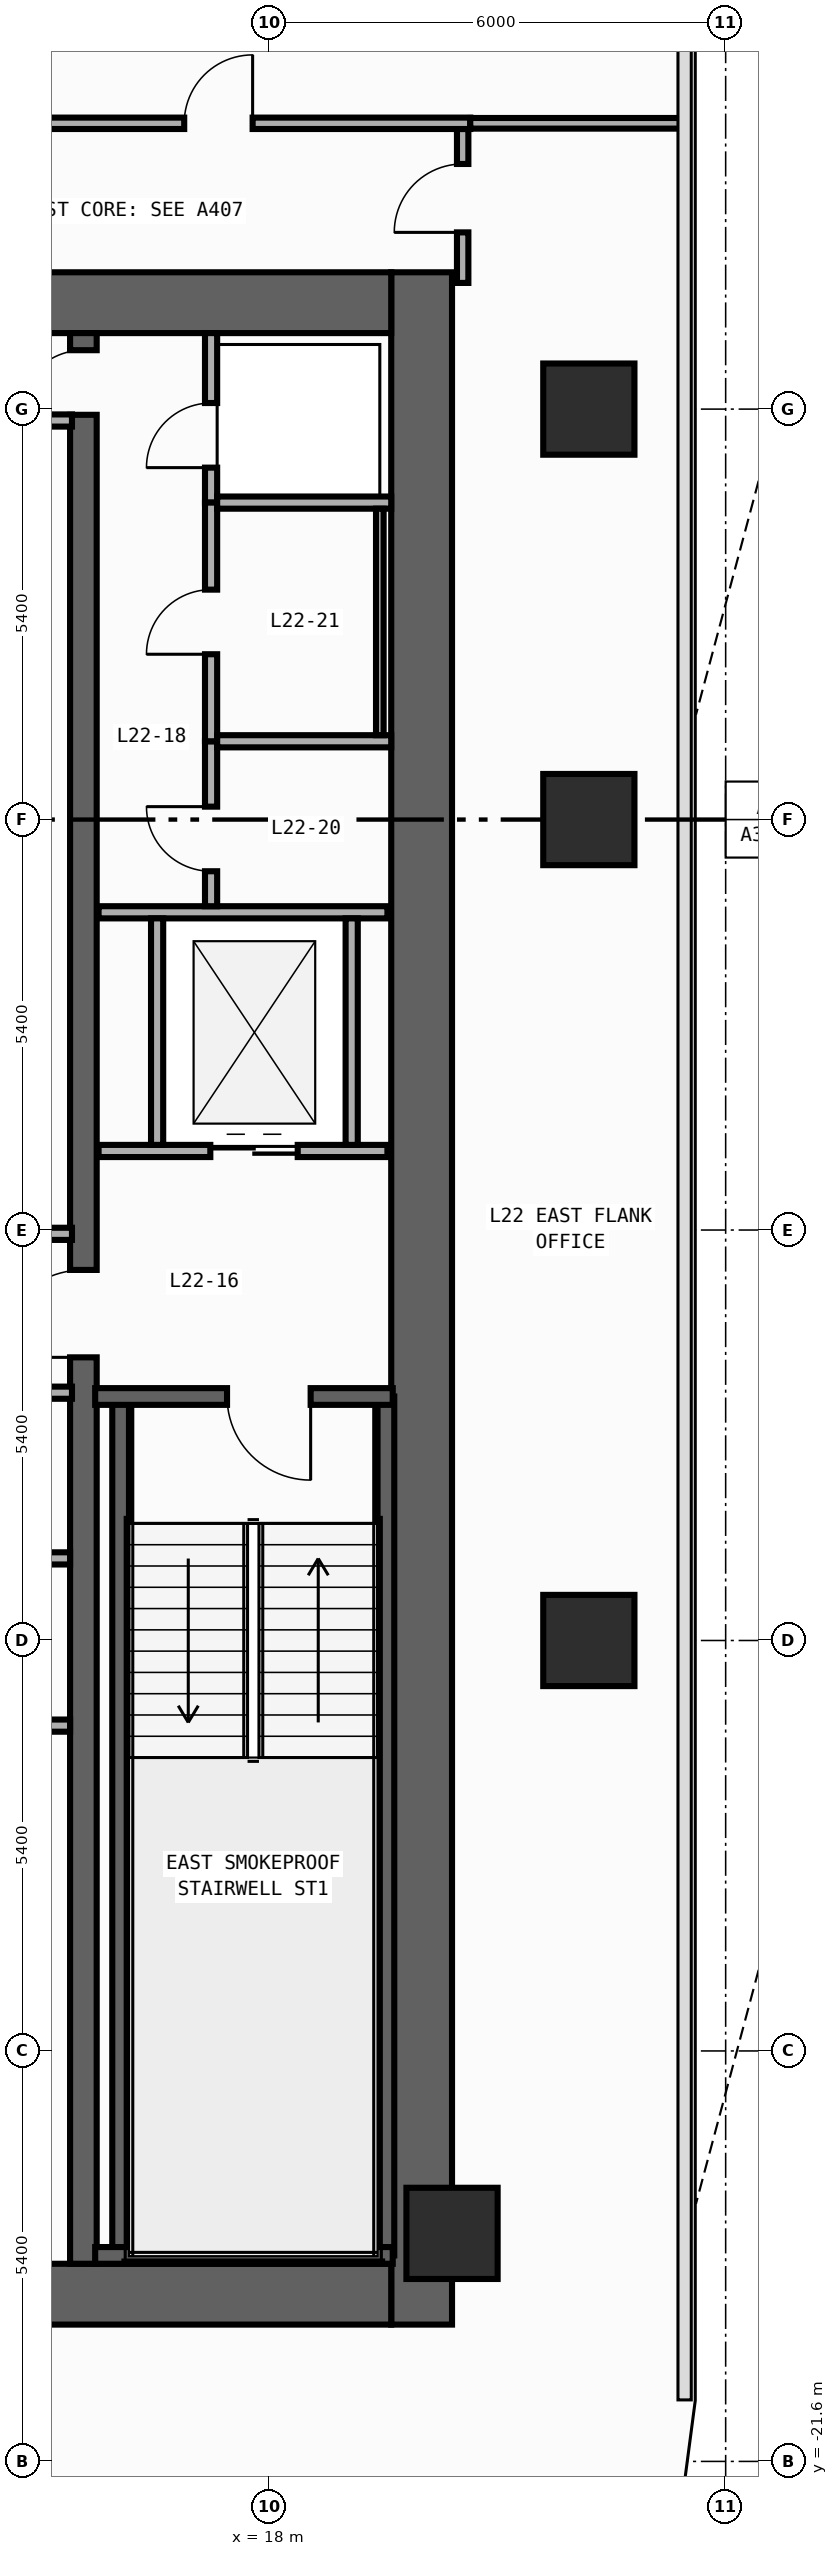
"""IFC4 building model, lengths in metres.
Left out: names, types, materials, properties, quantities, classifications, styles, units other than length and angle.
Written with IfcOpenShell. Run it as: python <this file> out.ifc"""

import sys

from ifc_helpers import new_model, si_unit, direction, frame, frame_2d, origin, origin_2d, place, context, subcontext, project, spatial, rectangle, extrude, element, fill, save


model = new_model("IFC4")
c1 = context("Model", 3, precision=1e-05, world=origin(), true_north=direction((0.0, 1.0)))
c2 = subcontext(c1, "Body", "Model", "MODEL_VIEW")
j1 = project(units=[si_unit("LENGTHUNIT", "METRE"), si_unit("PLANEANGLEUNIT", "RADIAN")], contexts=[c1])
p1 = place(None, origin())
s1 = spatial("IfcSite", under=j1, at=p1, CompositionType="ELEMENT")
p2 = place(p1, origin())
s2 = spatial("IfcBuilding", under=s1, at=p2, CompositionType="ELEMENT")
p3 = place(p2, frame((0.0, 0.0, 97.4)))
s3 = spatial("IfcBuildingStorey", under=s2, at=p3, CompositionType="ELEMENT", Elevation=97.4)
p4 = place(p3, frame((20.0, -19.8, 0.0), z_axis=(0.0, 0.0, 1.0), x_axis=(0.0, 1.0, 0.0)))
e1 = element("IfcWall", 1, at=p4, inside=s3, PredefinedType="SHEAR", context=c2, shape_type="SweptSolid", body=[
    extrude(rectangle(XDim=27.0, YDim=0.8, at=frame_2d((13.5, 0.0))), origin(), (0.0, 0.0, 1.0), 3.94),
])
for number, where, z_axis, x_axis in (
    (2, (12.8, -19.4, 0.0), (0.0, 0.0, 1.0), (1.0, 0.0, 0.0)),
    (3, (12.8, 6.8, 0.0), (0.0, 0.0, 1.0), (1.0, 0.0, 0.0)),
):
    element("IfcWall", number, at=place(p3, frame(where, z_axis=z_axis, x_axis=x_axis)), inside=s3, PredefinedType="SHEAR", context=c2, shape_type="SweptSolid", body=[
        extrude(rectangle(XDim=6.8, YDim=0.8, at=frame_2d((3.4, 0.0))), origin(), (0.0, 0.0, 1.0), 3.94),
    ])
p5 = place(p3, frame((15.55, -19.0, 0.0), z_axis=(0.0, 0.0, 1.0), x_axis=(0.0, 1.0, 0.0)))
e4 = element("IfcWall", 4, at=p5, inside=s3, PredefinedType="SHEAR", context=c2, shape_type="SweptSolid", body=[
    extrude(rectangle(XDim=25.4, YDim=0.35, at=frame_2d((12.7, 0.0))), origin(), (0.0, 0.0, 1.0), 3.94),
])
p6 = place(p5, frame((11.925, 0.0, 0.0)))
e5 = element("IfcOpeningElement", 5, at=p6, cuts=e4, PredefinedType="OPENING", context=c2, shape_type="SweptSolid", body=[
    extrude(rectangle(XDim=1.15, YDim=2.2, at=frame_2d((0.575, 1.1))), frame((0.0, 0.185, 0.0), z_axis=(0.0, -1.0, 0.0), x_axis=(1.0, 0.0, 0.0)), (0.0, 0.0, 1.0), 0.37),
])
p7 = place(p5, frame((24.325, 0.0, 0.0)))
e6 = element("IfcOpeningElement", 6, at=p7, cuts=e4, PredefinedType="OPENING", context=c2, shape_type="SweptSolid", body=[
    extrude(rectangle(XDim=0.85, YDim=2.1, at=frame_2d((0.425, 1.05))), frame((0.0, 0.185, 0.0), z_axis=(0.0, -1.0, 0.0), x_axis=(1.0, 0.0, 0.0)), (0.0, 0.0, 1.0), 0.37),
])
for number, where, z_axis, x_axis in (
    (7, (16.04, -18.89, 0.0), (0.0, 0.0, 1.0), (0.0, 1.0, 0.0)),
    (8, (19.53, -18.89, 0.0), (0.0, 0.0, 1.0), (0.0, 1.0, 0.0)),
):
    element("IfcWall", number, at=place(p3, frame(where, z_axis=z_axis, x_axis=x_axis)), inside=s3, PredefinedType="SHEAR", context=c2, shape_type="SweptSolid", body=[
        extrude(rectangle(XDim=11.3, YDim=0.22, at=frame_2d((5.65, 0.0))), origin(), (0.0, 0.0, 1.0), 3.94),
    ])
p8 = place(p3, frame((15.705, -18.89, 0.0), z_axis=(0.0, 0.0, 1.0), x_axis=(1.0, 0.0, 0.0)))
e9 = element("IfcWall", 9, at=p8, inside=s3, PredefinedType="SHEAR", context=c2, shape_type="SweptSolid", body=[
    extrude(rectangle(XDim=3.915, YDim=0.22, at=frame_2d((1.958, 0.0))), origin(), (0.0, 0.0, 1.0), 3.94),
])
p9 = place(p3, frame((19.62, -7.59, 0.0), z_axis=(0.0, 0.0, 1.0), x_axis=(-1.0, 0.0, 0.0)))
e10 = element("IfcWall", 10, at=p9, inside=s3, PredefinedType="SHEAR", context=c2, shape_type="SweptSolid", body=[
    extrude(rectangle(XDim=3.915, YDim=0.22, at=frame_2d((1.958, 0.0))), origin(), (0.0, 0.0, 1.0), 3.94),
])
p10 = place(p9, frame((1.08, 0.0, 0.0)))
e11 = element("IfcOpeningElement", 11, at=p10, cuts=e10, PredefinedType="OPENING", context=c2, shape_type="SweptSolid", body=[
    extrude(rectangle(XDim=1.1, YDim=2.2, at=frame_2d((0.55, 1.1))), frame((0.0, 0.12, 0.0), z_axis=(0.0, -1.0, 0.0), x_axis=(1.0, 0.0, 0.0)), (0.0, 0.0, 1.0), 0.24),
])
for number, where, z_axis, x_axis in (
    (12, (20.4, -18.6, 0.0), (0.0, 0.0, 1.0), (1.0, 0.0, 0.0)),
    (13, (22.2, -10.8, 0.0), (0.0, 0.0, 1.0), (1.0, 0.0, 0.0)),
    (14, (22.2, 0.0, 0.0), (0.0, 0.0, 1.0), (1.0, 0.0, 0.0)),
    (15, (22.2, 5.4, 0.0), (0.0, 0.0, 1.0), (1.0, 0.0, 0.0)),
):
    element("IfcColumn", number, at=place(p3, frame(where, z_axis=z_axis, x_axis=x_axis)), inside=s3, PredefinedType="COLUMN", context=c2, shape_type="SweptSolid", body=[
        extrude(rectangle(XDim=1.2, YDim=1.2, at=origin_2d()), origin(), (0.0, 0.0, 1.0), 4.2),
    ])
p11 = place(p3, frame((15.75, -4.36, 0.0), z_axis=(0.0, 0.0, 1.0), x_axis=(1.0, 0.0, 0.0)))
e16 = element("IfcWall", 16, at=p11, inside=s3, PredefinedType="STANDARD", context=c2, shape_type="SweptSolid", body=[
    extrude(rectangle(XDim=3.8, YDim=0.16, at=frame_2d((1.9, 0.0))), origin(), (0.0, 0.0, 1.0), 3.94),
])
p12 = place(p11, frame((1.47, 0.0, 0.0)))
e17 = element("IfcOpeningElement", 17, at=p12, cuts=e16, PredefinedType="OPENING", context=c2, shape_type="SweptSolid", body=[
    extrude(rectangle(XDim=1.15, YDim=2.2, at=frame_2d((0.575, 1.1))), frame((0.0, 0.09, 0.0), z_axis=(0.0, -1.0, 0.0), x_axis=(1.0, 0.0, 0.0)), (0.0, 0.0, 1.0), 0.18),
])
p13 = place(p3, frame((15.75, -1.22, 0.0), z_axis=(0.0, 0.0, 1.0), x_axis=(1.0, 0.0, 0.0)))
e18 = element("IfcWall", 18, at=p13, inside=s3, PredefinedType="STANDARD", context=c2, shape_type="SweptSolid", body=[
    extrude(rectangle(XDim=3.8, YDim=0.16, at=frame_2d((1.9, 0.0))), origin(), (0.0, 0.0, 1.0), 3.94),
])
for number, where, z_axis, x_axis in (
    (19, (16.52, -4.28, 0.0), (0.0, 0.0, 1.0), (0.0, 1.0, 0.0)),
    (20, (19.08, -4.28, 0.0), (0.0, 0.0, 1.0), (0.0, 1.0, 0.0)),
):
    element("IfcWall", number, at=place(p3, frame(where, z_axis=z_axis, x_axis=x_axis)), inside=s3, PredefinedType="STANDARD", context=c2, shape_type="SweptSolid", body=[
        extrude(rectangle(XDim=2.98, YDim=0.16, at=frame_2d((1.49, 0.0))), origin(), (0.0, 0.0, 1.0), 3.94),
    ])
for number, where, z_axis, x_axis in (
    (21, (12.8, -5.45, 0.0), (0.0, 0.0, 1.0), (1.0, 0.0, 0.0)),
    (22, (12.8, -7.54, 0.0), (0.0, 0.0, 1.0), (1.0, 0.0, 0.0)),
    (23, (12.8, 5.25, 0.0), (0.0, 0.0, 1.0), (1.0, 0.0, 0.0)),
):
    element("IfcWall", number, at=place(p3, frame(where, z_axis=z_axis, x_axis=x_axis)), inside=s3, PredefinedType="STANDARD", context=c2, shape_type="SweptSolid", body=[
        extrude(rectangle(XDim=2.6, YDim=0.16, at=frame_2d((1.3, 0.0))), origin(), (0.0, 0.0, 1.0), 3.94),
    ])
p14 = place(p3, frame((17.23, 4.17, 0.0), z_axis=(0.0, 0.0, 1.0), x_axis=(0.0, 1.0, 0.0)))
e24 = element("IfcWall", 24, at=p14, inside=s3, PredefinedType="PARTITIONING", context=c2, shape_type="SweptSolid", body=[
    extrude(rectangle(XDim=2.23, YDim=0.16, at=frame_2d((1.115, 0.0))), origin(), (0.0, 0.0, 1.0), 3.94),
])
p15 = place(p14, frame((0.46, 0.0, 0.0)))
e25 = element("IfcOpeningElement", 25, at=p15, cuts=e24, PredefinedType="OPENING", context=c2, shape_type="SweptSolid", body=[
    extrude(rectangle(XDim=0.85, YDim=2.1, at=frame_2d((0.425, 1.05))), frame((0.0, 0.09, 0.0), z_axis=(0.0, -1.0, 0.0), x_axis=(1.0, 0.0, 0.0)), (0.0, 0.0, 1.0), 0.18),
])
p16 = place(p3, frame((17.23, -1.14, 0.0), z_axis=(0.0, 0.0, 1.0), x_axis=(0.0, 1.0, 0.0)))
e26 = element("IfcWall", 26, at=p16, inside=s3, PredefinedType="PARTITIONING", context=c2, shape_type="SweptSolid", body=[
    extrude(rectangle(XDim=2.17, YDim=0.16, at=frame_2d((1.085, 0.0))), origin(), (0.0, 0.0, 1.0), 3.94),
])
p17 = place(p16, frame((0.46, 0.0, 0.0)))
e27 = element("IfcOpeningElement", 27, at=p17, cuts=e26, PredefinedType="OPENING", context=c2, shape_type="SweptSolid", body=[
    extrude(rectangle(XDim=0.85, YDim=2.1, at=frame_2d((0.425, 1.05))), frame((0.0, 0.09, 0.0), z_axis=(0.0, -1.0, 0.0), x_axis=(1.0, 0.0, 0.0)), (0.0, 0.0, 1.0), 0.18),
])
p18 = place(p3, frame((17.23, 1.03, 0.0), z_axis=(0.0, 0.0, 1.0), x_axis=(0.0, 1.0, 0.0)))
e28 = element("IfcWall", 28, at=p18, inside=s3, PredefinedType="PARTITIONING", context=c2, shape_type="SweptSolid", body=[
    extrude(rectangle(XDim=3.14, YDim=0.16, at=frame_2d((1.57, 0.0))), origin(), (0.0, 0.0, 1.0), 3.94),
])
p19 = place(p18, frame((1.145, 0.0, 0.0)))
e29 = element("IfcOpeningElement", 29, at=p19, cuts=e28, PredefinedType="OPENING", context=c2, shape_type="SweptSolid", body=[
    extrude(rectangle(XDim=0.85, YDim=2.1, at=frame_2d((0.425, 1.05))), frame((0.0, 0.09, 0.0), z_axis=(0.0, -1.0, 0.0), x_axis=(1.0, 0.0, 0.0)), (0.0, 0.0, 1.0), 0.18),
])
for number, where, z_axis, x_axis in (
    (30, (17.31, 4.17, 0.0), (0.0, 0.0, 1.0), (1.0, 0.0, 0.0)),
    (31, (17.31, 1.03, 0.0), (0.0, 0.0, 1.0), (1.0, 0.0, 0.0)),
):
    element("IfcWall", number, at=place(p3, frame(where, z_axis=z_axis, x_axis=x_axis)), inside=s3, PredefinedType="PARTITIONING", context=c2, shape_type="SweptSolid", body=[
        extrude(rectangle(XDim=2.29, YDim=0.16, at=frame_2d((1.145, 0.0))), origin(), (0.0, 0.0, 1.0), 3.94),
    ])
for number, where, z_axis, x_axis in (
    (32, (12.31, -11.92, 0.0), (0.0, 0.0, 1.0), (1.0, 0.0, 0.0)),
    (33, (12.31, -9.72, 0.0), (0.0, 0.0, 1.0), (1.0, 0.0, 0.0)),
):
    element("IfcWall", number, at=place(p3, frame(where, z_axis=z_axis, x_axis=x_axis)), inside=s3, PredefinedType="PARTITIONING", context=c2, shape_type="SweptSolid", body=[
        extrude(rectangle(XDim=3.065, YDim=0.16, at=frame_2d((1.532, 0.0))), origin(), (0.0, 0.0, 1.0), 3.94),
    ])
p20 = place(p3, frame((20.54, 7.06, 0.0), z_axis=(0.0, 0.0, 1.0), x_axis=(0.0, 1.0, 0.0)))
e34 = element("IfcWall", 34, at=p20, inside=s3, PredefinedType="PARTITIONING", context=c2, shape_type="SweptSolid", body=[
    extrude(rectangle(XDim=2.025, YDim=0.15, at=frame_2d((1.012, 0.0))), origin(), (0.0, 0.0, 1.0), 3.94),
])
p21 = place(p20, frame((0.665, 0.0, 0.0)))
e35 = element("IfcOpeningElement", 35, at=p21, cuts=e34, PredefinedType="OPENING", context=c2, shape_type="SweptSolid", body=[
    extrude(rectangle(XDim=0.9, YDim=2.15, at=frame_2d((0.45, 1.075))), frame((0.0, 0.085, 0.0), z_axis=(0.0, -1.0, 0.0), x_axis=(1.0, 0.0, 0.0)), (0.0, 0.0, 1.0), 0.17),
])
p22 = place(p3, frame((11.81, 9.16, 0.0), z_axis=(0.0, 0.0, 1.0), x_axis=(1.0, 0.0, 0.0)))
e36 = element("IfcWall", 36, at=p22, inside=s3, PredefinedType="PARTITIONING", context=c2, shape_type="SweptSolid", body=[
    extrude(rectangle(XDim=8.83, YDim=0.15, at=frame_2d((4.415, 0.0))), origin(), (0.0, 0.0, 1.0), 3.94),
])
p23 = place(p22, frame((5.067, 0.0, 0.0)))
e37 = element("IfcOpeningElement", 37, at=p23, cuts=e36, PredefinedType="OPENING", context=c2, shape_type="SweptSolid", body=[
    extrude(rectangle(XDim=0.9, YDim=2.15, at=frame_2d((0.45, 1.075))), frame((0.0, 0.085, 0.0), z_axis=(0.0, -1.0, 0.0), x_axis=(1.0, 0.0, 0.0)), (0.0, 0.0, 1.0), 0.17),
])
p24 = place(p3, frame((20.64, 9.16, 0.0), z_axis=(0.0, 0.0, 1.0), x_axis=(1.0, 0.0, 0.0)))
e38 = element("IfcWall", 38, at=p24, inside=s3, PredefinedType="PARTITIONING", context=c2, shape_type="SweptSolid", body=[
    extrude(rectangle(XDim=2.815, YDim=0.14, at=frame_2d((1.408, 0.0))), origin(), (0.0, 0.0, 1.0), 3.94),
])
p25 = place(p3, frame((19.45, 4.09, 0.0), z_axis=(0.0, 0.0, 1.0), x_axis=(0.0, -1.0, 0.0)))
e39 = element("IfcWall", 39, at=p25, inside=s3, PredefinedType="PARTITIONING", context=c2, shape_type="SweptSolid", body=[
    extrude(rectangle(XDim=2.98, YDim=0.1, at=frame_2d((1.49, 0.0))), origin(), (0.0, 0.0, 1.0), 3.94),
])
p26 = place(p10, origin())
e40 = element("IfcDoor", 40, at=p26, inside=s3, OperationType="SINGLE_SWING_LEFT", PredefinedType="DOOR", context=c2, shape_type="SweptSolid", body=[
    extrude(rectangle(XDim=1.1, YDim=2.2, at=frame_2d((0.55, 1.1))), frame((0.0, 0.025, 0.0), z_axis=(0.0, -1.0, 0.0), x_axis=(1.0, 0.0, 0.0)), (0.0, 0.0, 1.0), 0.05),
])
fill(e11, e40)
p27 = place(p6, origin())
e41 = element("IfcDoor", 41, at=p27, inside=s3, OperationType="SINGLE_SWING_LEFT", PredefinedType="DOOR", context=c2, shape_type="SweptSolid", body=[
    extrude(rectangle(XDim=1.15, YDim=2.2, at=frame_2d((0.575, 1.1))), frame((0.0, 0.025, 0.0), z_axis=(0.0, -1.0, 0.0), x_axis=(1.0, 0.0, 0.0)), (0.0, 0.0, 1.0), 0.05),
])
fill(e5, e41)
p28 = place(p7, origin())
e42 = element("IfcDoor", 42, at=p28, inside=s3, OperationType="SINGLE_SWING_LEFT", PredefinedType="DOOR", context=c2, shape_type="SweptSolid", body=[
    extrude(rectangle(XDim=0.85, YDim=2.1, at=frame_2d((0.425, 1.05))), frame((0.0, 0.025, 0.0), z_axis=(0.0, -1.0, 0.0), x_axis=(1.0, 0.0, 0.0)), (0.0, 0.0, 1.0), 0.05),
])
fill(e6, e42)
p29 = place(p12, origin())
e43 = element("IfcDoor", 43, at=p29, inside=s3, OperationType="DOUBLE_DOOR_SLIDING", PredefinedType="DOOR", context=c2, shape_type="SweptSolid", body=[
    extrude(rectangle(XDim=1.15, YDim=2.2, at=frame_2d((0.575, 1.1))), frame((0.0, 0.025, 0.0), z_axis=(0.0, -1.0, 0.0), x_axis=(1.0, 0.0, 0.0)), (0.0, 0.0, 1.0), 0.05),
])
fill(e17, e43)
p30 = place(p15, origin())
e44 = element("IfcDoor", 44, at=p30, inside=s3, OperationType="SINGLE_SWING_LEFT", PredefinedType="DOOR", context=c2, shape_type="SweptSolid", body=[
    extrude(rectangle(XDim=0.85, YDim=2.1, at=frame_2d((0.425, 1.05))), frame((0.0, 0.025, 0.0), z_axis=(0.0, -1.0, 0.0), x_axis=(1.0, 0.0, 0.0)), (0.0, 0.0, 1.0), 0.05),
])
fill(e25, e44)
p31 = place(p17, origin())
e45 = element("IfcDoor", 45, at=p31, inside=s3, OperationType="SINGLE_SWING_RIGHT", PredefinedType="DOOR", context=c2, shape_type="SweptSolid", body=[
    extrude(rectangle(XDim=0.85, YDim=2.1, at=frame_2d((0.425, 1.05))), frame((0.0, 0.025, 0.0), z_axis=(0.0, -1.0, 0.0), x_axis=(1.0, 0.0, 0.0)), (0.0, 0.0, 1.0), 0.05),
])
fill(e27, e45)
p32 = place(p19, origin())
e46 = element("IfcDoor", 46, at=p32, inside=s3, OperationType="SINGLE_SWING_LEFT", PredefinedType="DOOR", context=c2, shape_type="SweptSolid", body=[
    extrude(rectangle(XDim=0.85, YDim=2.1, at=frame_2d((0.425, 1.05))), frame((0.0, 0.025, 0.0), z_axis=(0.0, -1.0, 0.0), x_axis=(1.0, 0.0, 0.0)), (0.0, 0.0, 1.0), 0.05),
])
fill(e29, e46)
p33 = place(p21, origin())
e47 = element("IfcDoor", 47, at=p33, inside=s3, OperationType="SINGLE_SWING_LEFT", PredefinedType="DOOR", context=c2, shape_type="SweptSolid", body=[
    extrude(rectangle(XDim=0.9, YDim=2.15, at=frame_2d((0.45, 1.075))), frame((0.0, 0.025, 0.0), z_axis=(0.0, -1.0, 0.0), x_axis=(1.0, 0.0, 0.0)), (0.0, 0.0, 1.0), 0.05),
])
fill(e35, e47)
p34 = place(p23, origin())
e48 = element("IfcDoor", 48, at=p34, inside=s3, OperationType="SINGLE_SWING_RIGHT", PredefinedType="DOOR", context=c2, shape_type="SweptSolid", body=[
    extrude(rectangle(XDim=0.9, YDim=2.15, at=frame_2d((0.45, 1.075))), frame((0.0, 0.025, 0.0), z_axis=(0.0, -1.0, 0.0), x_axis=(1.0, 0.0, 0.0)), (0.0, 0.0, 1.0), 0.05),
])
fill(e37, e48)
save(model, sys.argv[1])
